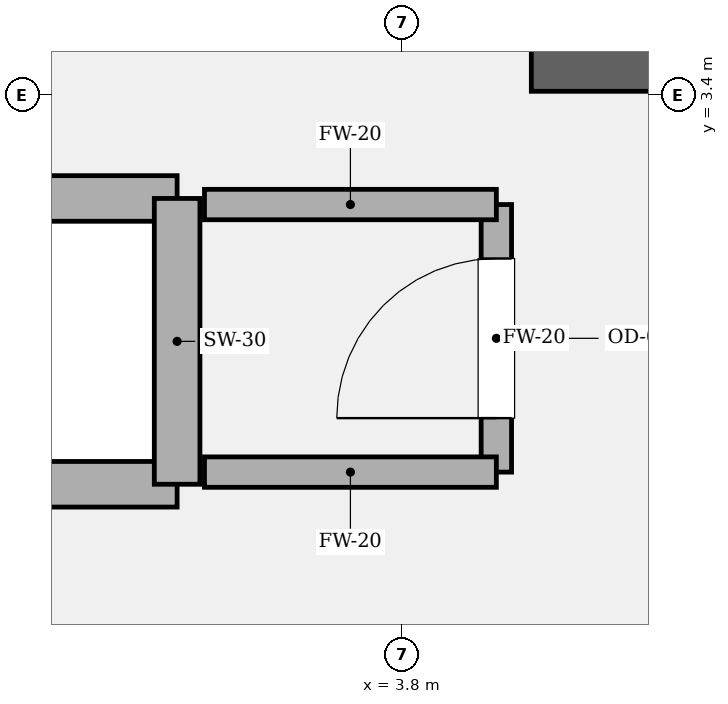
"""IFC4 building model, lengths in metres.
Left out: names, types, materials, properties, quantities, classifications, styles, units other than length and angle.
Written with IfcOpenShell. Run it as: python <this file> out.ifc"""

import sys

from ifc_helpers import new_model, si_unit, direction, frame, frame_2d, origin, place, context, subcontext, project, spatial, rectangle, extrude, element, fill, save


model = new_model("IFC4")
c1 = context("Model", 3, precision=1e-05, world=origin(), true_north=direction((0.0, 1.0)))
c2 = subcontext(c1, "Body", "Model", "MODEL_VIEW")
j1 = project(units=[si_unit("LENGTHUNIT", "METRE"), si_unit("PLANEANGLEUNIT", "RADIAN")], contexts=[c1])
p1 = place(None, origin())
s1 = spatial("IfcSite", under=j1, at=p1, CompositionType="ELEMENT")
p2 = place(p1, origin())
s2 = spatial("IfcBuilding", under=s1, at=p2, CompositionType="ELEMENT")
p3 = place(p2, frame((0.0, 0.0, 279.75)))
s3 = spatial("IfcBuildingStorey", under=s2, at=p3, CompositionType="ELEMENT", Elevation=279.75)
p4 = place(p3, frame((4.65, 3.6, 0.0), z_axis=(0.0, 0.0, 1.0), x_axis=(1.0, 0.0, 0.0)))
e1 = element("IfcWall", 1, at=p4, inside=s3, PredefinedType="SOLIDWALL", context=c2, shape_type="SweptSolid", body=[
    extrude(rectangle(XDim=5.275, YDim=0.35, at=frame_2d((2.638, 0.0))), origin(), (0.0, 0.0, 1.0), 4.05),
])
for number, where, z_axis, x_axis in (
    (2, (-2.32, 0.84, 0.0), (0.0, 0.0, 1.0), (1.0, 0.0, 0.0)),
    (3, (-2.32, 2.72, 0.0), (0.0, 0.0, 1.0), (1.0, 0.0, 0.0)),
):
    element("IfcWall", number, at=place(p3, frame(where, z_axis=z_axis, x_axis=x_axis)), inside=s3, PredefinedType="SOLIDWALL", context=c2, shape_type="SweptSolid", body=[
        extrude(rectangle(XDim=4.64, YDim=0.3, at=frame_2d((2.32, 0.0))), origin(), (0.0, 0.0, 1.0), 3.77),
    ])
p5 = place(p3, frame((2.32, 0.84, 0.0), z_axis=(0.0, 0.0, 1.0), x_axis=(0.0, 1.0, 0.0)))
e4 = element("IfcWall", 4, at=p5, inside=s3, PredefinedType="SOLIDWALL", context=c2, shape_type="SweptSolid", body=[
    extrude(rectangle(XDim=1.88, YDim=0.3, at=frame_2d((0.94, 0.0))), origin(), (0.0, 0.0, 1.0), 3.77),
])
p6 = place(p3, frame((4.42, 0.92, 0.0), z_axis=(0.0, 0.0, 1.0), x_axis=(0.0, 1.0, 0.0)))
e5 = element("IfcWall", 5, at=p6, inside=s3, PredefinedType="SOLIDWALL", context=c2, shape_type="SweptSolid", body=[
    extrude(rectangle(XDim=1.76, YDim=0.2, at=frame_2d((0.88, 0.0))), origin(), (0.0, 0.0, 1.0), 3.77),
])
p7 = place(p6, frame((0.355, 0.0, 0.0)))
e6 = element("IfcOpeningElement", 6, at=p7, cuts=e5, PredefinedType="OPENING", context=c2, shape_type="SweptSolid", body=[
    extrude(rectangle(XDim=1.05, YDim=2.2, at=frame_2d((0.525, 1.1))), frame((0.0, 0.11, 0.0), z_axis=(0.0, -1.0, 0.0), x_axis=(1.0, 0.0, 0.0)), (0.0, 0.0, 1.0), 0.22),
])
for number, where, z_axis, x_axis in (
    (7, (4.42, 2.68, 0.0), (0.0, 0.0, 1.0), (-1.0, 0.0, 0.0)),
    (8, (2.5, 0.92, 0.0), (0.0, 0.0, 1.0), (1.0, 0.0, 0.0)),
):
    element("IfcWall", number, at=place(p3, frame(where, z_axis=z_axis, x_axis=x_axis)), inside=s3, PredefinedType="SOLIDWALL", context=c2, shape_type="SweptSolid", body=[
        extrude(rectangle(XDim=1.92, YDim=0.2, at=frame_2d((0.96, 0.0))), origin(), (0.0, 0.0, 1.0), 3.77),
    ])
p8 = place(p7, origin())
e9 = element("IfcDoor", 9, at=p8, inside=s3, OperationType="SINGLE_SWING_LEFT", PredefinedType="DOOR", context=c2, shape_type="SweptSolid", body=[
    extrude(rectangle(XDim=1.05, YDim=2.2, at=frame_2d((0.525, 1.1))), frame((0.0, 0.025, 0.0), z_axis=(0.0, -1.0, 0.0), x_axis=(1.0, 0.0, 0.0)), (0.0, 0.0, 1.0), 0.05),
])
fill(e6, e9)
save(model, sys.argv[1])
